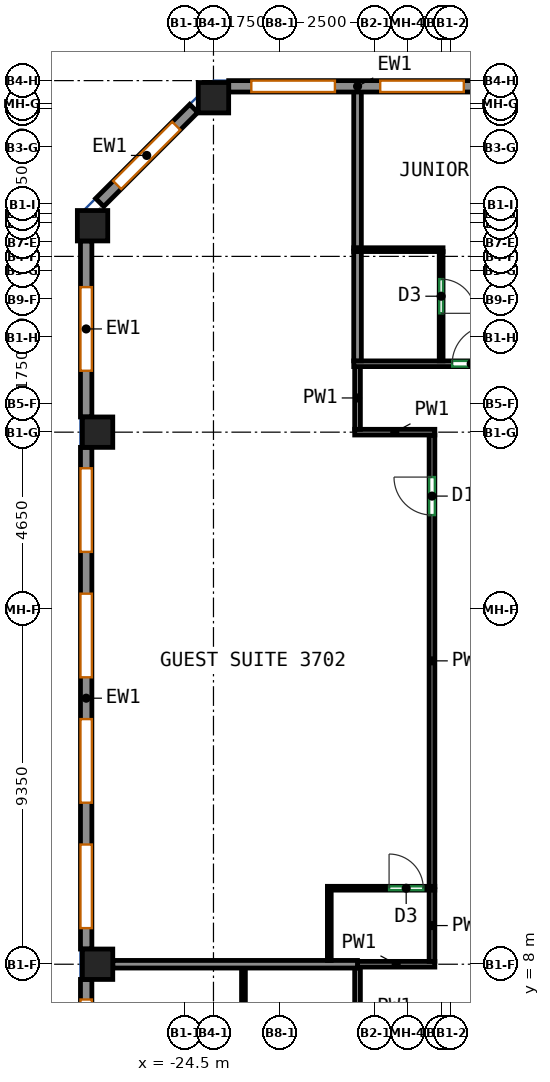
"""IFC4 building model, lengths in metres.
Left out: names, types, materials, properties, quantities, classifications, styles, units other than length and angle.
Written with IfcOpenShell. Run it as: python <this file> out.ifc"""

import sys

from ifc_helpers import new_model, si_unit, direction, frame, frame_2d, origin, origin_2d, place, context, subcontext, project, spatial, rectangle, extrude, source, transform, mapped, element, fill, save


model = new_model("IFC4")
c1 = context("Model", 3, precision=1e-05, world=origin(), true_north=direction((0.0, 1.0)))
c2 = subcontext(c1, "Body", "Model", "MODEL_VIEW")
j1 = project(units=[si_unit("LENGTHUNIT", "METRE"), si_unit("PLANEANGLEUNIT", "RADIAN")], contexts=[c1])
p1 = place(None, origin())
s1 = spatial("IfcSite", under=j1, at=p1, CompositionType="ELEMENT")
p2 = place(p1, origin())
s2 = spatial("IfcBuilding", under=s1, at=p2, CompositionType="ELEMENT")
p3 = place(p2, frame((0.0, 0.0, 160.9)))
s3 = spatial("IfcBuildingStorey", under=s2, at=p3, CompositionType="ELEMENT", Elevation=160.9)
m1 = source(origin(), c2, "Body", "SweptSolid", [
    extrude(rectangle(XDim=0.8, YDim=0.8, at=origin_2d()), origin(), (0.0, 0.0, 1.0), 3.0),
])
for number, where, z_axis, x_axis in (
    (1, (-26.932, 27.432, 0.0), (0.0, 0.0, 1.0), (1.0, 0.0, 0.0)),
    (2, (-26.8, 8.0, 0.0), (0.0, 0.0, 1.0), (1.0, 0.0, 0.0)),
    (3, (-26.8, 22.0, 0.0), (0.0, 0.0, 1.0), (1.0, 0.0, 0.0)),
    (4, (-23.75, 30.8, 0.0), (0.0, 0.0, 1.0), (1.0, 0.0, 0.0)),
):
    element("IfcColumn", number, at=place(p3, frame(where, z_axis=z_axis, x_axis=x_axis)), inside=s3, PredefinedType="COLUMN", context=c2, shape_type="MappedRepresentation", body=[
        mapped(m1, transform((0.0, 0.0, 0.0))),
    ])
m2 = source(origin(), c2, "Body", "SweptSolid", [
    extrude(rectangle(XDim=6.783, YDim=0.3, at=frame_2d((3.392, 0.0))), origin(), (0.0, 0.0, 1.0), 3.0),
])
p4 = place(p3, frame((-16.567, 31.1, 0.0), z_axis=(0.0, 0.0, 1.0), x_axis=(-1.0, 0.0, 0.0)))
e5 = element("IfcWall", 5, at=p4, inside=s3, PredefinedType="SOLIDWALL", context=c2, shape_type="MappedRepresentation", body=[
    mapped(m2, transform((0.0, 0.0, 0.0))),
])
p5 = place(p4, frame((0.596, 0.0, 0.85)))
e6 = element("IfcOpeningElement", 6, at=p5, cuts=e5, PredefinedType="OPENING", context=c2, shape_type="SweptSolid", body=[
    extrude(rectangle(XDim=2.2, YDim=1.95, at=frame_2d((1.1, 0.975))), frame((0.0, 0.16, 0.0), z_axis=(0.0, -1.0, 0.0), x_axis=(1.0, 0.0, 0.0)), (0.0, 0.0, 1.0), 0.32),
])
p6 = place(p4, frame((3.988, 0.0, 0.85)))
e7 = element("IfcOpeningElement", 7, at=p6, cuts=e5, PredefinedType="OPENING", context=c2, shape_type="SweptSolid", body=[
    extrude(rectangle(XDim=2.2, YDim=1.95, at=frame_2d((1.1, 0.975))), frame((0.0, 0.16, 0.0), z_axis=(0.0, -1.0, 0.0), x_axis=(1.0, 0.0, 0.0)), (0.0, 0.0, 1.0), 0.32),
])
m3 = source(origin(), c2, "Body", "SweptSolid", [
    extrude(rectangle(XDim=3.5, YDim=0.3, at=frame_2d((1.75, 0.0))), origin(), (0.0, 0.0, 1.0), 3.0),
])
p7 = place(p3, frame((-24.269, 30.519, 0.0), z_axis=(0.0, 0.0, 1.0), x_axis=(-0.707141656123, -0.70707190453, 0.0)))
e8 = element("IfcWall", 8, at=p7, inside=s3, PredefinedType="SOLIDWALL", context=c2, shape_type="MappedRepresentation", body=[
    mapped(m3, transform((0.0, 0.0, 0.0))),
])
p8 = place(p7, frame((0.65, 0.0, 0.85)))
e9 = element("IfcOpeningElement", 9, at=p8, cuts=e8, PredefinedType="OPENING", context=c2, shape_type="SweptSolid", body=[
    extrude(rectangle(XDim=2.2, YDim=1.95, at=frame_2d((1.1, 0.975))), frame((0.0, 0.16, 0.0), z_axis=(0.0, -1.0, 0.0), x_axis=(1.0, 0.0, 0.0)), (0.0, 0.0, 1.0), 0.32),
])
m4 = source(origin(), c2, "Body", "SweptSolid", [
    extrude(rectangle(XDim=4.632, YDim=0.3, at=frame_2d((2.316, 0.0))), origin(), (0.0, 0.0, 1.0), 3.0),
])
p9 = place(p3, frame((-27.1, 27.032, 0.0), z_axis=(0.0, 0.0, 1.0), x_axis=(0.0, -1.0, 0.0)))
e10 = element("IfcWall", 10, at=p9, inside=s3, PredefinedType="SOLIDWALL", context=c2, shape_type="MappedRepresentation", body=[
    mapped(m4, transform((0.0, 0.0, 0.0))),
])
p10 = place(p9, frame((1.216, 0.0, 0.85)))
e11 = element("IfcOpeningElement", 11, at=p10, cuts=e10, PredefinedType="OPENING", context=c2, shape_type="SweptSolid", body=[
    extrude(rectangle(XDim=2.2, YDim=1.95, at=frame_2d((1.1, 0.975))), frame((0.0, 0.16, 0.0), z_axis=(0.0, -1.0, 0.0), x_axis=(1.0, 0.0, 0.0)), (0.0, 0.0, 1.0), 0.32),
])
m5 = source(origin(), c2, "Body", "SweptSolid", [
    extrude(rectangle(XDim=13.2, YDim=0.3, at=frame_2d((6.6, 0.0))), origin(), (0.0, 0.0, 1.0), 3.0),
])
p11 = place(p3, frame((-27.1, 21.6, 0.0), z_axis=(0.0, 0.0, 1.0), x_axis=(0.0, -1.0, 0.0)))
e12 = element("IfcWall", 12, at=p11, inside=s3, PredefinedType="SOLIDWALL", context=c2, shape_type="MappedRepresentation", body=[
    mapped(m5, transform((0.0, 0.0, 0.0))),
])
p12 = place(p11, frame((0.55, 0.0, 0.85)))
e13 = element("IfcOpeningElement", 13, at=p12, cuts=e12, PredefinedType="OPENING", context=c2, shape_type="SweptSolid", body=[
    extrude(rectangle(XDim=2.2, YDim=1.95, at=frame_2d((1.1, 0.975))), frame((0.0, 0.16, 0.0), z_axis=(0.0, -1.0, 0.0), x_axis=(1.0, 0.0, 0.0)), (0.0, 0.0, 1.0), 0.32),
])
p13 = place(p11, frame((3.85, 0.0, 0.85)))
e14 = element("IfcOpeningElement", 14, at=p13, cuts=e12, PredefinedType="OPENING", context=c2, shape_type="SweptSolid", body=[
    extrude(rectangle(XDim=2.2, YDim=1.95, at=frame_2d((1.1, 0.975))), frame((0.0, 0.16, 0.0), z_axis=(0.0, -1.0, 0.0), x_axis=(1.0, 0.0, 0.0)), (0.0, 0.0, 1.0), 0.32),
])
p14 = place(p11, frame((7.15, 0.0, 0.85)))
e15 = element("IfcOpeningElement", 15, at=p14, cuts=e12, PredefinedType="OPENING", context=c2, shape_type="SweptSolid", body=[
    extrude(rectangle(XDim=2.2, YDim=1.95, at=frame_2d((1.1, 0.975))), frame((0.0, 0.16, 0.0), z_axis=(0.0, -1.0, 0.0), x_axis=(1.0, 0.0, 0.0)), (0.0, 0.0, 1.0), 0.32),
])
p15 = place(p11, frame((10.45, 0.0, 0.85)))
e16 = element("IfcOpeningElement", 16, at=p15, cuts=e12, PredefinedType="OPENING", context=c2, shape_type="SweptSolid", body=[
    extrude(rectangle(XDim=2.2, YDim=1.95, at=frame_2d((1.1, 0.975))), frame((0.0, 0.16, 0.0), z_axis=(0.0, -1.0, 0.0), x_axis=(1.0, 0.0, 0.0)), (0.0, 0.0, 1.0), 0.32),
])
m6 = source(origin(), c2, "Body", "SweptSolid", [
    extrude(rectangle(XDim=6.513, YDim=0.3, at=frame_2d((3.256, 0.0))), origin(), (0.0, 0.0, 1.0), 3.0),
])
p16 = place(p3, frame((-27.1, 7.6, 0.0), z_axis=(0.0, 0.0, 1.0), x_axis=(0.0, -1.0, 0.0)))
e17 = element("IfcWall", 17, at=p16, inside=s3, PredefinedType="SOLIDWALL", context=c2, shape_type="MappedRepresentation", body=[
    mapped(m6, transform((0.0, 0.0, 0.0))),
])
p17 = place(p16, frame((0.528, 0.0, 0.85)))
e18 = element("IfcOpeningElement", 18, at=p17, cuts=e17, PredefinedType="OPENING", context=c2, shape_type="SweptSolid", body=[
    extrude(rectangle(XDim=2.2, YDim=1.95, at=frame_2d((1.1, 0.975))), frame((0.0, 0.16, 0.0), z_axis=(0.0, -1.0, 0.0), x_axis=(1.0, 0.0, 0.0)), (0.0, 0.0, 1.0), 0.32),
])
p18 = place(p16, frame((3.784, 0.0, 0.85)))
e19 = element("IfcOpeningElement", 19, at=p18, cuts=e17, PredefinedType="OPENING", context=c2, shape_type="SweptSolid", body=[
    extrude(rectangle(XDim=2.2, YDim=1.95, at=frame_2d((1.1, 0.975))), frame((0.0, 0.16, 0.0), z_axis=(0.0, -1.0, 0.0), x_axis=(1.0, 0.0, 0.0)), (0.0, 0.0, 1.0), 0.32),
])
p19 = place(p3, frame((-19.959, 5.84, 0.0), z_axis=(0.0, 0.0, 1.0), x_axis=(0.0, 1.0, 0.0)))
e20 = element("IfcWall", 20, at=p19, inside=s3, PredefinedType="PARTITIONING", context=c2, shape_type="SweptSolid", body=[
    extrude(rectangle(XDim=2.06, YDim=0.15, at=frame_2d((1.03, 0.0))), origin(), (0.0, 0.0, 1.0), 3.0),
])
p20 = place(p3, frame((-18.0, 10.04, 0.0), z_axis=(0.0, 0.0, 1.0), x_axis=(0.0, 1.0, 0.0)))
e21 = element("IfcWall", 21, at=p20, inside=s3, PredefinedType="PARTITIONING", context=c2, shape_type="SweptSolid", body=[
    extrude(rectangle(XDim=11.885, YDim=0.15, at=frame_2d((5.942, 0.0))), origin(), (0.0, 0.0, 1.0), 3.0),
])
p21 = place(p20, frame((9.778, 0.0, 0.0)))
e22 = element("IfcOpeningElement", 22, at=p21, cuts=e21, PredefinedType="OPENING", context=c2, shape_type="SweptSolid", body=[
    extrude(rectangle(XDim=1.0, YDim=2.1, at=frame_2d((0.5, 1.05))), frame((0.0, 0.085, 0.0), z_axis=(0.0, -1.0, 0.0), x_axis=(1.0, 0.0, 0.0)), (0.0, 0.0, 1.0), 0.17),
])
p22 = place(p3, frame((-20.034, 22.0, 0.0), z_axis=(0.0, 0.0, 1.0), x_axis=(1.0, 0.0, 0.0)))
e23 = element("IfcWall", 23, at=p22, inside=s3, PredefinedType="PARTITIONING", context=c2, shape_type="SweptSolid", body=[
    extrude(rectangle(XDim=2.109, YDim=0.15, at=frame_2d((1.054, 0.0))), origin(), (0.0, 0.0, 1.0), 3.0),
])
p23 = place(p3, frame((-19.959, 22.075, 0.0), z_axis=(0.0, 0.0, 1.0), x_axis=(0.0, 1.0, 0.0)))
e24 = element("IfcWall", 24, at=p23, inside=s3, PredefinedType="PARTITIONING", context=c2, shape_type="SweptSolid", body=[
    extrude(rectangle(XDim=1.65, YDim=0.15, at=frame_2d((0.825, 0.0))), origin(), (0.0, 0.0, 1.0), 3.0),
])
p24 = place(p3, frame((-17.925, 8.0, 0.0), z_axis=(0.0, 0.0, 1.0), x_axis=(-1.0, 0.0, 0.0)))
e25 = element("IfcWall", 25, at=p24, inside=s3, PredefinedType="PARTITIONING", context=c2, shape_type="SweptSolid", body=[
    extrude(rectangle(XDim=2.034, YDim=0.15, at=frame_2d((1.017, 0.0))), origin(), (0.0, 0.0, 1.0), 3.0),
])
p25 = place(p3, frame((-18.0, 8.075, 0.0), z_axis=(0.0, 0.0, 1.0), x_axis=(0.0, 1.0, 0.0)))
e26 = element("IfcWall", 26, at=p25, inside=s3, PredefinedType="PARTITIONING", context=c2, shape_type="SweptSolid", body=[
    extrude(rectangle(XDim=1.885, YDim=0.15, at=frame_2d((0.942, 0.0))), origin(), (0.0, 0.0, 1.0), 3.0),
])
p26 = place(p3, frame((-20.059, 23.8, 0.0), z_axis=(0.0, 0.0, 1.0), x_axis=(1.0, 0.0, 0.0)))
e27 = element("IfcWall", 27, at=p26, inside=s3, PredefinedType="PARTITIONING", context=c2, shape_type="SweptSolid", body=[
    extrude(rectangle(XDim=41.909, YDim=0.15, at=frame_2d((20.955, 0.0))), origin(), (0.0, 0.0, 1.0), 3.0),
])
p27 = place(p26, frame((2.59, 0.0, 0.0)))
e28 = element("IfcOpeningElement", 28, at=p27, cuts=e27, PredefinedType="OPENING", context=c2, shape_type="SweptSolid", body=[
    extrude(rectangle(XDim=1.0, YDim=2.1, at=frame_2d((0.5, 1.05))), frame((0.0, 0.085, 0.0), z_axis=(0.0, -1.0, 0.0), x_axis=(1.0, 0.0, 0.0)), (0.0, 0.0, 1.0), 0.17),
])
p28 = place(p26, frame((8.875, 0.0, 0.0)))
e29 = element("IfcOpeningElement", 29, at=p28, cuts=e27, PredefinedType="OPENING", context=c2, shape_type="SweptSolid", body=[
    extrude(rectangle(XDim=1.0, YDim=2.1, at=frame_2d((0.5, 1.05))), frame((0.0, 0.085, 0.0), z_axis=(0.0, -1.0, 0.0), x_axis=(1.0, 0.0, 0.0)), (0.0, 0.0, 1.0), 0.17),
])
p29 = place(p26, frame((19.203, 0.0, 0.0)))
e30 = element("IfcOpeningElement", 30, at=p29, cuts=e27, PredefinedType="OPENING", context=c2, shape_type="SweptSolid", body=[
    extrude(rectangle(XDim=1.0, YDim=2.1, at=frame_2d((0.5, 1.05))), frame((0.0, 0.085, 0.0), z_axis=(0.0, -1.0, 0.0), x_axis=(1.0, 0.0, 0.0)), (0.0, 0.0, 1.0), 0.17),
])
p30 = place(p26, frame((28.634, 0.0, 0.0)))
e31 = element("IfcOpeningElement", 31, at=p30, cuts=e27, PredefinedType="OPENING", context=c2, shape_type="SweptSolid", body=[
    extrude(rectangle(XDim=1.0, YDim=2.1, at=frame_2d((0.5, 1.05))), frame((0.0, 0.085, 0.0), z_axis=(0.0, -1.0, 0.0), x_axis=(1.0, 0.0, 0.0)), (0.0, 0.0, 1.0), 0.17),
])
p31 = place(p26, frame((36.616, 0.0, 0.0)))
e32 = element("IfcOpeningElement", 32, at=p31, cuts=e27, PredefinedType="OPENING", context=c2, shape_type="SweptSolid", body=[
    extrude(rectangle(XDim=1.0, YDim=2.1, at=frame_2d((0.5, 1.05))), frame((0.0, 0.085, 0.0), z_axis=(0.0, -1.0, 0.0), x_axis=(1.0, 0.0, 0.0)), (0.0, 0.0, 1.0), 0.17),
])
p32 = place(p26, frame((38.208, 0.0, 0.0)))
e33 = element("IfcOpeningElement", 33, at=p32, cuts=e27, PredefinedType="OPENING", context=c2, shape_type="SweptSolid", body=[
    extrude(rectangle(XDim=1.0, YDim=2.1, at=frame_2d((0.5, 1.05))), frame((0.0, 0.085, 0.0), z_axis=(0.0, -1.0, 0.0), x_axis=(1.0, 0.0, 0.0)), (0.0, 0.0, 1.0), 0.17),
])
p33 = place(p3, frame((-22.961, 5.85, 0.0), z_axis=(0.0, 0.0, 1.0), x_axis=(0.0, 1.0, 0.0)))
e34 = element("IfcWall", 34, at=p33, inside=s3, PredefinedType="PARTITIONING", context=c2, shape_type="SweptSolid", body=[
    extrude(rectangle(XDim=2.05, YDim=0.1, at=frame_2d((1.025, 0.0))), origin(), (0.0, 0.0, 1.0), 3.0),
])
p34 = place(p3, frame((-26.4, 8.0, 0.0), z_axis=(0.0, 0.0, 1.0), x_axis=(1.0, 0.0, 0.0)))
e35 = element("IfcWall", 35, at=p34, inside=s3, PredefinedType="PARTITIONING", context=c2, shape_type="SweptSolid", body=[
    extrude(rectangle(XDim=6.439, YDim=0.2, at=frame_2d((3.219, 0.0))), origin(), (0.0, 0.0, 1.0), 3.0),
])
p35 = place(p3, frame((-20.752, 10.0, 0.0), z_axis=(0.0, 0.0, 1.0), x_axis=(1.0, 0.0, 0.0)))
e36 = element("IfcWall", 36, at=p35, inside=s3, PredefinedType="PARTITIONING", context=c2, shape_type="SweptSolid", body=[
    extrude(rectangle(XDim=2.825, YDim=0.1, at=frame_2d((1.413, 0.0))), origin(), (0.0, 0.0, 1.0), 3.0),
])
p36 = place(p35, frame((1.623, 0.0, 0.0)))
e37 = element("IfcOpeningElement", 37, at=p36, cuts=e36, PredefinedType="OPENING", context=c2, shape_type="SweptSolid", body=[
    extrude(rectangle(XDim=0.9, YDim=2.1, at=frame_2d((0.45, 1.05))), frame((0.0, 0.06, 0.0), z_axis=(0.0, -1.0, 0.0), x_axis=(1.0, 0.0, 0.0)), (0.0, 0.0, 1.0), 0.12),
])
p37 = place(p3, frame((-20.702, 8.1, 0.0), z_axis=(0.0, 0.0, 1.0), x_axis=(0.0, 1.0, 0.0)))
e38 = element("IfcWall", 38, at=p37, inside=s3, PredefinedType="PARTITIONING", context=c2, shape_type="SweptSolid", body=[
    extrude(rectangle(XDim=1.85, YDim=0.1, at=frame_2d((0.925, 0.0))), origin(), (0.0, 0.0, 1.0), 3.0),
])
p38 = place(p3, frame((-19.959, 26.842, 0.0), z_axis=(0.0, 0.0, 1.0), x_axis=(0.0, 1.0, 0.0)))
e39 = element("IfcWall", 39, at=p38, inside=s3, PredefinedType="PARTITIONING", context=c2, shape_type="SweptSolid", body=[
    extrude(rectangle(XDim=4.158, YDim=0.2, at=frame_2d((2.079, 0.0))), origin(), (0.0, 0.0, 1.0), 3.0),
])
p39 = place(p3, frame((-19.959, 23.877, 0.0), z_axis=(0.0, 0.0, 1.0), x_axis=(0.0, 1.0, 0.0)))
e40 = element("IfcWall", 40, at=p39, inside=s3, PredefinedType="PARTITIONING", context=c2, shape_type="SweptSolid", body=[
    extrude(rectangle(XDim=2.885, YDim=0.2, at=frame_2d((1.442, 0.0))), origin(), (0.0, 0.0, 1.0), 3.0),
])
p40 = place(p3, frame((-17.759, 26.752, 0.0), z_axis=(0.0, 0.0, 1.0), x_axis=(0.0, -1.0, 0.0)))
e41 = element("IfcWall", 41, at=p40, inside=s3, PredefinedType="PARTITIONING", context=c2, shape_type="SweptSolid", body=[
    extrude(rectangle(XDim=2.875, YDim=0.1, at=frame_2d((1.438, 0.0))), origin(), (0.0, 0.0, 1.0), 3.0),
])
p41 = place(p40, frame((0.725, 0.0, 0.0)))
e42 = element("IfcOpeningElement", 42, at=p41, cuts=e41, PredefinedType="OPENING", context=c2, shape_type="SweptSolid", body=[
    extrude(rectangle(XDim=0.9, YDim=2.1, at=frame_2d((0.45, 1.05))), frame((0.0, 0.06, 0.0), z_axis=(0.0, -1.0, 0.0), x_axis=(1.0, 0.0, 0.0)), (0.0, 0.0, 1.0), 0.12),
])
p42 = place(p3, frame((-20.059, 26.802, 0.0), z_axis=(0.0, 0.0, 1.0), x_axis=(1.0, 0.0, 0.0)))
e43 = element("IfcWall", 43, at=p42, inside=s3, PredefinedType="PARTITIONING", context=c2, shape_type="SweptSolid", body=[
    extrude(rectangle(XDim=2.35, YDim=0.1, at=frame_2d((1.175, 0.0))), origin(), (0.0, 0.0, 1.0), 3.0),
])
p43 = place(p5, origin())
e44 = element("IfcWindow", 44, at=p43, inside=s3, PartitioningType="SINGLE_PANEL", PredefinedType="WINDOW", context=c2, shape_type="SweptSolid", body=[
    extrude(rectangle(XDim=2.2, YDim=1.95, at=frame_2d((1.1, 0.975))), frame((0.0, 0.03, 0.0), z_axis=(0.0, -1.0, 0.0), x_axis=(1.0, 0.0, 0.0)), (0.0, 0.0, 1.0), 0.06),
])
fill(e6, e44)
p44 = place(p6, origin())
e45 = element("IfcWindow", 45, at=p44, inside=s3, PartitioningType="SINGLE_PANEL", PredefinedType="WINDOW", context=c2, shape_type="SweptSolid", body=[
    extrude(rectangle(XDim=2.2, YDim=1.95, at=frame_2d((1.1, 0.975))), frame((0.0, 0.03, 0.0), z_axis=(0.0, -1.0, 0.0), x_axis=(1.0, 0.0, 0.0)), (0.0, 0.0, 1.0), 0.06),
])
fill(e7, e45)
p45 = place(p8, origin())
e46 = element("IfcWindow", 46, at=p45, inside=s3, PartitioningType="SINGLE_PANEL", PredefinedType="WINDOW", context=c2, shape_type="SweptSolid", body=[
    extrude(rectangle(XDim=2.2, YDim=1.95, at=frame_2d((1.1, 0.975))), frame((0.0, 0.03, 0.0), z_axis=(0.0, -1.0, 0.0), x_axis=(1.0, 0.0, 0.0)), (0.0, 0.0, 1.0), 0.06),
])
fill(e9, e46)
p46 = place(p10, origin())
e47 = element("IfcWindow", 47, at=p46, inside=s3, PartitioningType="SINGLE_PANEL", PredefinedType="WINDOW", context=c2, shape_type="SweptSolid", body=[
    extrude(rectangle(XDim=2.2, YDim=1.95, at=frame_2d((1.1, 0.975))), frame((0.0, 0.03, 0.0), z_axis=(0.0, -1.0, 0.0), x_axis=(1.0, 0.0, 0.0)), (0.0, 0.0, 1.0), 0.06),
])
fill(e11, e47)
p47 = place(p12, origin())
e48 = element("IfcWindow", 48, at=p47, inside=s3, PartitioningType="SINGLE_PANEL", PredefinedType="WINDOW", context=c2, shape_type="SweptSolid", body=[
    extrude(rectangle(XDim=2.2, YDim=1.95, at=frame_2d((1.1, 0.975))), frame((0.0, 0.03, 0.0), z_axis=(0.0, -1.0, 0.0), x_axis=(1.0, 0.0, 0.0)), (0.0, 0.0, 1.0), 0.06),
])
fill(e13, e48)
p48 = place(p13, origin())
e49 = element("IfcWindow", 49, at=p48, inside=s3, PartitioningType="SINGLE_PANEL", PredefinedType="WINDOW", context=c2, shape_type="SweptSolid", body=[
    extrude(rectangle(XDim=2.2, YDim=1.95, at=frame_2d((1.1, 0.975))), frame((0.0, 0.03, 0.0), z_axis=(0.0, -1.0, 0.0), x_axis=(1.0, 0.0, 0.0)), (0.0, 0.0, 1.0), 0.06),
])
fill(e14, e49)
p49 = place(p14, origin())
e50 = element("IfcWindow", 50, at=p49, inside=s3, PartitioningType="SINGLE_PANEL", PredefinedType="WINDOW", context=c2, shape_type="SweptSolid", body=[
    extrude(rectangle(XDim=2.2, YDim=1.95, at=frame_2d((1.1, 0.975))), frame((0.0, 0.03, 0.0), z_axis=(0.0, -1.0, 0.0), x_axis=(1.0, 0.0, 0.0)), (0.0, 0.0, 1.0), 0.06),
])
fill(e15, e50)
p50 = place(p15, origin())
e51 = element("IfcWindow", 51, at=p50, inside=s3, PartitioningType="SINGLE_PANEL", PredefinedType="WINDOW", context=c2, shape_type="SweptSolid", body=[
    extrude(rectangle(XDim=2.2, YDim=1.95, at=frame_2d((1.1, 0.975))), frame((0.0, 0.03, 0.0), z_axis=(0.0, -1.0, 0.0), x_axis=(1.0, 0.0, 0.0)), (0.0, 0.0, 1.0), 0.06),
])
fill(e16, e51)
p51 = place(p17, origin())
e52 = element("IfcWindow", 52, at=p51, inside=s3, PartitioningType="SINGLE_PANEL", PredefinedType="WINDOW", context=c2, shape_type="SweptSolid", body=[
    extrude(rectangle(XDim=2.2, YDim=1.95, at=frame_2d((1.1, 0.975))), frame((0.0, 0.03, 0.0), z_axis=(0.0, -1.0, 0.0), x_axis=(1.0, 0.0, 0.0)), (0.0, 0.0, 1.0), 0.06),
])
fill(e18, e52)
p52 = place(p36, origin())
e53 = element("IfcDoor", 53, at=p52, inside=s3, OperationType="SINGLE_SWING_LEFT", PredefinedType="DOOR", context=c2, shape_type="SweptSolid", body=[
    extrude(rectangle(XDim=0.9, YDim=2.1, at=frame_2d((0.45, 1.05))), frame((0.0, 0.025, 0.0), z_axis=(0.0, -1.0, 0.0), x_axis=(1.0, 0.0, 0.0)), (0.0, 0.0, 1.0), 0.05),
])
fill(e37, e53)
p53 = place(p21, origin())
e54 = element("IfcDoor", 54, at=p53, inside=s3, OperationType="SINGLE_SWING_RIGHT", PredefinedType="DOOR", context=c2, shape_type="SweptSolid", body=[
    extrude(rectangle(XDim=1.0, YDim=2.1, at=frame_2d((0.5, 1.05))), frame((0.0, 0.025, 0.0), z_axis=(0.0, -1.0, 0.0), x_axis=(1.0, 0.0, 0.0)), (0.0, 0.0, 1.0), 0.05),
])
fill(e22, e54)
p54 = place(p27, origin())
e55 = element("IfcDoor", 55, at=p54, inside=s3, OperationType="SINGLE_SWING_RIGHT", PredefinedType="DOOR", context=c2, shape_type="SweptSolid", body=[
    extrude(rectangle(XDim=1.0, YDim=2.1, at=frame_2d((0.5, 1.05))), frame((0.0, 0.025, 0.0), z_axis=(0.0, -1.0, 0.0), x_axis=(1.0, 0.0, 0.0)), (0.0, 0.0, 1.0), 0.05),
])
fill(e28, e55)
p55 = place(p41, origin())
e56 = element("IfcDoor", 56, at=p55, inside=s3, OperationType="SINGLE_SWING_RIGHT", PredefinedType="DOOR", context=c2, shape_type="SweptSolid", body=[
    extrude(rectangle(XDim=0.9, YDim=2.1, at=frame_2d((0.45, 1.05))), frame((0.0, 0.025, 0.0), z_axis=(0.0, -1.0, 0.0), x_axis=(1.0, 0.0, 0.0)), (0.0, 0.0, 1.0), 0.05),
])
fill(e42, e56)
save(model, sys.argv[1])
